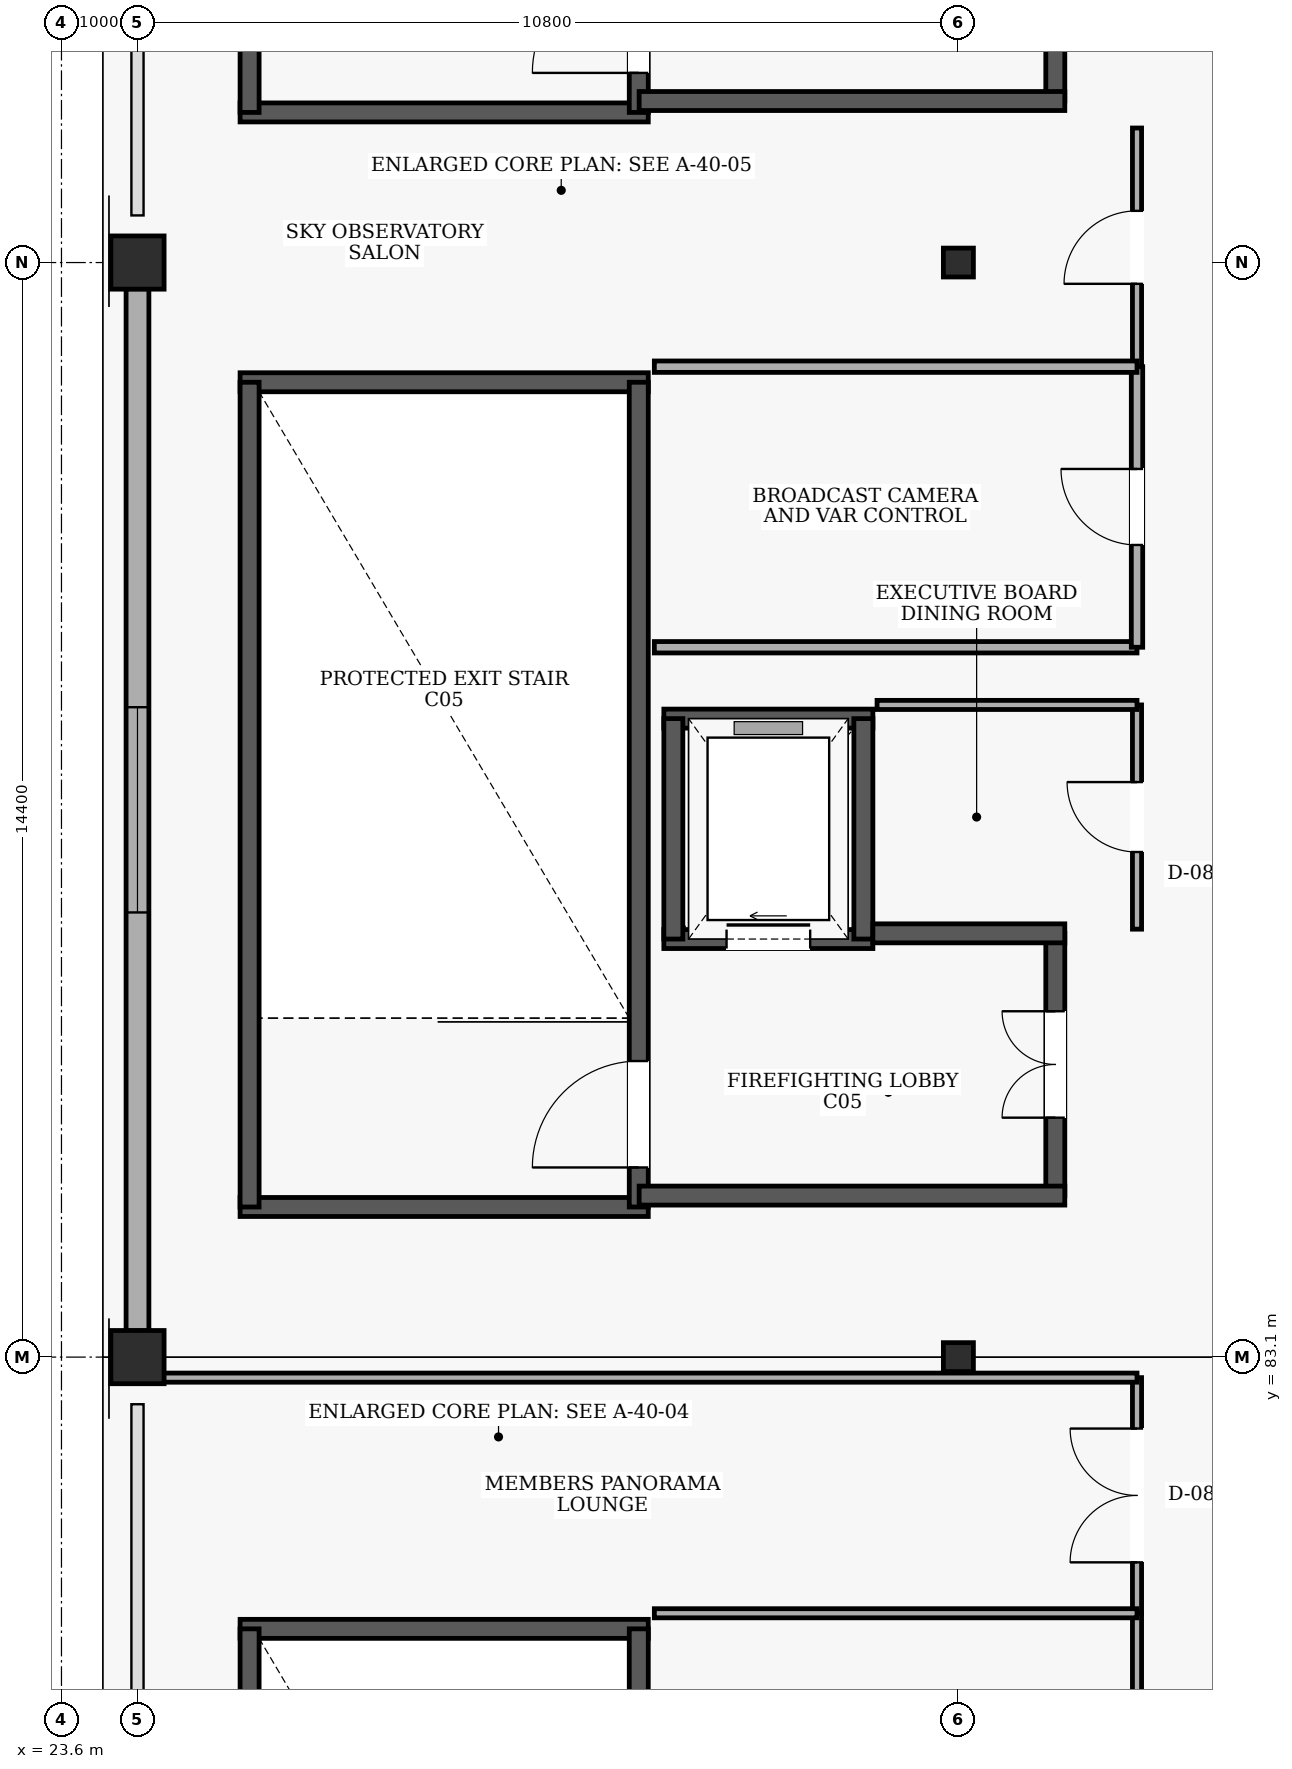
"""IFC4 building model, lengths in metres.
Left out: names, types, materials, properties, quantities, classifications, styles, units other than length and angle.
Written with IfcOpenShell. Run it as: python <this file> out.ifc"""

import sys

from ifc_helpers import new_model, si_unit, direction, frame, frame_2d, origin, origin_2d, place, context, subcontext, project, spatial, rectangle, i_section, extrude, element, fill, save


model = new_model("IFC4")
c1 = context("Model", 3, precision=1e-05, world=origin(), true_north=direction((0.0, 1.0)))
c2 = subcontext(c1, "Body", "Model", "MODEL_VIEW")
j1 = project(units=[si_unit("LENGTHUNIT", "METRE"), si_unit("PLANEANGLEUNIT", "RADIAN")], contexts=[c1])
p1 = place(None, origin())
s1 = spatial("IfcSite", under=j1, at=p1, CompositionType="ELEMENT")
p2 = place(p1, origin())
s2 = spatial("IfcBuilding", under=s1, at=p2, CompositionType="ELEMENT")
p3 = place(p2, frame((0.0, 0.0, 29.4)))
s3 = spatial("IfcBuildingStorey", under=s2, at=p3, CompositionType="ELEMENT", Elevation=29.4)
for number, where, z_axis, x_axis in (
    (1, (24.6, 83.1, 0.0), (0.0, 0.0, 1.0), (1.0, 0.0, 0.0)),
    (2, (24.6, 97.5, 0.0), (0.0, 0.0, 1.0), (1.0, 0.0, 0.0)),
):
    element("IfcColumn", number, at=place(p3, frame(where, z_axis=z_axis, x_axis=x_axis)), inside=s3, PredefinedType="COLUMN", context=c2, shape_type="SweptSolid", body=[
        extrude(rectangle(XDim=0.7, YDim=0.7, at=origin_2d()), origin(), (0.0, 0.0, 1.0), 4.8),
    ])
for number, where, z_axis, x_axis in (
    (3, (35.4, 83.1, 0.0), (0.0, 0.0, 1.0), (1.0, 0.0, 0.0)),
    (4, (35.4, 97.5, 0.0), (0.0, 0.0, 1.0), (1.0, 0.0, 0.0)),
):
    element("IfcColumn", number, at=place(p3, frame(where, z_axis=z_axis, x_axis=x_axis)), inside=s3, PredefinedType="COLUMN", context=c2, shape_type="SweptSolid", body=[
        extrude(i_section(OverallWidth=0.395, OverallDepth=0.38, WebThickness=0.019, FlangeThickness=0.03, at=origin_2d()), origin(), (0.0, 0.0, 1.0), 4.8),
    ])
p4 = place(p3, frame((24.6, 83.445, 0.0), z_axis=(0.0, 0.0, 1.0), x_axis=(0.0, 1.0, 0.0)))
e5 = element("IfcWall", 5, at=p4, inside=s3, PredefinedType="SOLIDWALL", context=c2, shape_type="SweptSolid", body=[
    extrude(rectangle(XDim=13.71, YDim=0.3, at=frame_2d((6.855, 0.0))), origin(), (0.0, 0.0, 1.0), 3.68),
])
p5 = place(p4, frame((5.505, 0.0, 0.9)))
e6 = element("IfcOpeningElement", 6, at=p5, cuts=e5, PredefinedType="OPENING", context=c2, shape_type="SweptSolid", body=[
    extrude(rectangle(XDim=2.7, YDim=1.8, at=frame_2d((1.35, 0.9))), frame((0.0, 0.16, 0.0), z_axis=(0.0, -1.0, 0.0), x_axis=(1.0, 0.0, 0.0)), (0.0, 0.0, 1.0), 0.32),
])
p6 = place(p3, frame((31.32, 79.525, 0.0), z_axis=(0.0, 0.0, 1.0), x_axis=(-1.0, 0.0, 0.0)))
e7 = element("IfcWall", 7, at=p6, inside=s3, PredefinedType="SHEAR", context=c2, shape_type="SweptSolid", body=[
    extrude(rectangle(XDim=5.37, YDim=0.25, at=frame_2d((2.685, 0.0))), origin(), (0.0, 0.0, 1.0), 4.5),
])
p7 = place(p3, frame((26.075, 68.675, 0.0), z_axis=(0.0, 0.0, 1.0), x_axis=(0.0, 1.0, 0.0)))
e8 = element("IfcWall", 8, at=p7, inside=s3, PredefinedType="SHEAR", context=c2, shape_type="SweptSolid", body=[
    extrude(rectangle(XDim=10.85, YDim=0.25, at=frame_2d((5.425, 0.0))), origin(), (0.0, 0.0, 1.0), 4.5),
])
p8 = place(p3, frame((31.195, 68.675, 0.0), z_axis=(0.0, 0.0, 1.0), x_axis=(0.0, 1.0, 0.0)))
e9 = element("IfcWall", 9, at=p8, inside=s3, PredefinedType="SHEAR", context=c2, shape_type="SweptSolid", body=[
    extrude(rectangle(XDim=10.85, YDim=0.25, at=frame_2d((5.425, 0.0))), origin(), (0.0, 0.0, 1.0), 4.5),
])
p9 = place(p8, frame((0.52, 0.0, 0.0)))
e10 = element("IfcOpeningElement", 10, at=p9, cuts=e9, PredefinedType="OPENING", context=c2, shape_type="SweptSolid", body=[
    extrude(rectangle(XDim=1.4, YDim=2.15, at=frame_2d((0.7, 1.075))), frame((0.0, 0.135, 0.0), z_axis=(0.0, -1.0, 0.0), x_axis=(1.0, 0.0, 0.0)), (0.0, 0.0, 1.0), 0.27),
])
for number, where, z_axis, x_axis in (
    (11, (25.95, 85.075, 0.0), (0.0, 0.0, 1.0), (1.0, 0.0, 0.0)),
    (12, (31.32, 95.925, 0.0), (0.0, 0.0, 1.0), (-1.0, 0.0, 0.0)),
):
    element("IfcWall", number, at=place(p3, frame(where, z_axis=z_axis, x_axis=x_axis)), inside=s3, PredefinedType="SHEAR", context=c2, shape_type="SweptSolid", body=[
        extrude(rectangle(XDim=5.37, YDim=0.25, at=frame_2d((2.685, 0.0))), origin(), (0.0, 0.0, 1.0), 4.5),
    ])
p10 = place(p3, frame((26.075, 85.075, 0.0), z_axis=(0.0, 0.0, 1.0), x_axis=(0.0, 1.0, 0.0)))
e13 = element("IfcWall", 13, at=p10, inside=s3, PredefinedType="SHEAR", context=c2, shape_type="SweptSolid", body=[
    extrude(rectangle(XDim=10.85, YDim=0.25, at=frame_2d((5.425, 0.0))), origin(), (0.0, 0.0, 1.0), 4.5),
])
p11 = place(p3, frame((31.195, 85.075, 0.0), z_axis=(0.0, 0.0, 1.0), x_axis=(0.0, 1.0, 0.0)))
e14 = element("IfcWall", 14, at=p11, inside=s3, PredefinedType="SHEAR", context=c2, shape_type="SweptSolid", body=[
    extrude(rectangle(XDim=10.85, YDim=0.25, at=frame_2d((5.425, 0.0))), origin(), (0.0, 0.0, 1.0), 4.5),
])
p12 = place(p11, frame((0.52, 0.0, 0.0)))
e15 = element("IfcOpeningElement", 15, at=p12, cuts=e14, PredefinedType="OPENING", context=c2, shape_type="SweptSolid", body=[
    extrude(rectangle(XDim=1.4, YDim=2.15, at=frame_2d((0.7, 1.075))), frame((0.0, 0.135, 0.0), z_axis=(0.0, -1.0, 0.0), x_axis=(1.0, 0.0, 0.0)), (0.0, 0.0, 1.0), 0.27),
])
p13 = place(p3, frame((25.95, 99.475, 0.0), z_axis=(0.0, 0.0, 1.0), x_axis=(1.0, 0.0, 0.0)))
e16 = element("IfcWall", 16, at=p13, inside=s3, PredefinedType="SHEAR", context=c2, shape_type="SweptSolid", body=[
    extrude(rectangle(XDim=5.37, YDim=0.25, at=frame_2d((2.685, 0.0))), origin(), (0.0, 0.0, 1.0), 4.5),
])
p14 = place(p3, frame((26.075, 99.475, 0.0), z_axis=(0.0, 0.0, 1.0), x_axis=(0.0, 1.0, 0.0)))
e17 = element("IfcWall", 17, at=p14, inside=s3, PredefinedType="SHEAR", context=c2, shape_type="SweptSolid", body=[
    extrude(rectangle(XDim=10.85, YDim=0.25, at=frame_2d((5.425, 0.0))), origin(), (0.0, 0.0, 1.0), 4.5),
])
p15 = place(p3, frame((31.195, 99.475, 0.0), z_axis=(0.0, 0.0, 1.0), x_axis=(0.0, 1.0, 0.0)))
e18 = element("IfcWall", 18, at=p15, inside=s3, PredefinedType="SHEAR", context=c2, shape_type="SweptSolid", body=[
    extrude(rectangle(XDim=10.85, YDim=0.25, at=frame_2d((5.425, 0.0))), origin(), (0.0, 0.0, 1.0), 4.5),
])
p16 = place(p15, frame((0.52, 0.0, 0.0)))
e19 = element("IfcOpeningElement", 19, at=p16, cuts=e18, PredefinedType="OPENING", context=c2, shape_type="SweptSolid", body=[
    extrude(rectangle(XDim=1.4, YDim=2.15, at=frame_2d((0.7, 1.075))), frame((0.0, 0.135, 0.0), z_axis=(0.0, -1.0, 0.0), x_axis=(1.0, 0.0, 0.0)), (0.0, 0.0, 1.0), 0.27),
])
p17 = place(p3, frame((31.525, 88.6, 0.0), z_axis=(0.0, 0.0, 1.0), x_axis=(1.0, 0.0, 0.0)))
e20 = element("IfcWall", 20, at=p17, inside=s3, PredefinedType="SHEAR", context=c2, shape_type="SweptSolid", body=[
    extrude(rectangle(XDim=2.75, YDim=0.25, at=frame_2d((1.375, 0.0))), origin(), (0.0, 0.0, 1.0), 4.5),
])
p18 = place(p17, frame((0.825, 0.0, 0.0)))
e21 = element("IfcOpeningElement", 21, at=p18, cuts=e20, PredefinedType="OPENING", context=c2, shape_type="SweptSolid", body=[
    extrude(rectangle(XDim=1.1, YDim=2.15, at=frame_2d((0.55, 1.075))), frame((0.0, 0.135, 0.0), z_axis=(0.0, -1.0, 0.0), x_axis=(1.0, 0.0, 0.0)), (0.0, 0.0, 1.0), 0.27),
])
p19 = place(p3, frame((34.275, 91.5, 0.0), z_axis=(0.0, 0.0, 1.0), x_axis=(-1.0, 0.0, 0.0)))
e22 = element("IfcWall", 22, at=p19, inside=s3, PredefinedType="SHEAR", context=c2, shape_type="SweptSolid", body=[
    extrude(rectangle(XDim=2.75, YDim=0.25, at=frame_2d((1.375, 0.0))), origin(), (0.0, 0.0, 1.0), 4.5),
])
for number, where, z_axis, x_axis in (
    (23, (31.65, 91.5, 0.0), (0.0, 0.0, 1.0), (0.0, -1.0, 0.0)),
    (24, (34.15, 88.6, 0.0), (0.0, 0.0, 1.0), (0.0, 1.0, 0.0)),
):
    element("IfcWall", number, at=place(p3, frame(where, z_axis=z_axis, x_axis=x_axis)), inside=s3, PredefinedType="SHEAR", context=c2, shape_type="SweptSolid", body=[
        extrude(rectangle(XDim=2.9, YDim=0.25, at=frame_2d((1.45, 0.0))), origin(), (0.0, 0.0, 1.0), 4.5),
    ])
p20 = place(p3, frame((36.675, 85.225, 0.0), z_axis=(0.0, 0.0, 1.0), x_axis=(0.0, 1.0, 0.0)))
e25 = element("IfcWall", 25, at=p20, inside=s3, PredefinedType="SHEAR", context=c2, shape_type="SweptSolid", body=[
    extrude(rectangle(XDim=3.45, YDim=0.25, at=frame_2d((1.725, 0.0))), origin(), (0.0, 0.0, 1.0), 4.5),
])
p21 = place(p20, frame((1.025, 0.0, 0.0)))
e26 = element("IfcOpeningElement", 26, at=p21, cuts=e25, PredefinedType="OPENING", context=c2, shape_type="SweptSolid", body=[
    extrude(rectangle(XDim=1.4, YDim=2.15, at=frame_2d((0.7, 1.075))), frame((0.0, 0.135, 0.0), z_axis=(0.0, -1.0, 0.0), x_axis=(1.0, 0.0, 0.0)), (0.0, 0.0, 1.0), 0.27),
])
p22 = place(p3, frame((34.275, 88.675, 0.0), z_axis=(0.0, 0.0, 1.0), x_axis=(1.0, 0.0, 0.0)))
e27 = element("IfcWall", 27, at=p22, inside=s3, PredefinedType="SHEAR", context=c2, shape_type="SweptSolid", body=[
    extrude(rectangle(XDim=2.525, YDim=0.25, at=frame_2d((1.263, 0.0))), origin(), (0.0, 0.0, 1.0), 4.5),
])
p23 = place(p3, frame((31.2, 85.225, 0.0), z_axis=(0.0, 0.0, 1.0), x_axis=(1.0, 0.0, 0.0)))
e28 = element("IfcWall", 28, at=p23, inside=s3, PredefinedType="SHEAR", context=c2, shape_type="SweptSolid", body=[
    extrude(rectangle(XDim=5.6, YDim=0.25, at=frame_2d((2.8, 0.0))), origin(), (0.0, 0.0, 1.0), 4.5),
])
p24 = place(p3, frame((36.675, 99.625, 0.0), z_axis=(0.0, 0.0, 1.0), x_axis=(0.0, 1.0, 0.0)))
e29 = element("IfcWall", 29, at=p24, inside=s3, PredefinedType="SHEAR", context=c2, shape_type="SweptSolid", body=[
    extrude(rectangle(XDim=3.45, YDim=0.25, at=frame_2d((1.725, 0.0))), origin(), (0.0, 0.0, 1.0), 4.5),
])
p25 = place(p24, frame((1.025, 0.0, 0.0)))
e30 = element("IfcOpeningElement", 30, at=p25, cuts=e29, PredefinedType="OPENING", context=c2, shape_type="SweptSolid", body=[
    extrude(rectangle(XDim=1.4, YDim=2.15, at=frame_2d((0.7, 1.075))), frame((0.0, 0.135, 0.0), z_axis=(0.0, -1.0, 0.0), x_axis=(1.0, 0.0, 0.0)), (0.0, 0.0, 1.0), 0.27),
])
p26 = place(p3, frame((31.2, 99.625, 0.0), z_axis=(0.0, 0.0, 1.0), x_axis=(1.0, 0.0, 0.0)))
e31 = element("IfcWall", 31, at=p26, inside=s3, PredefinedType="SHEAR", context=c2, shape_type="SweptSolid", body=[
    extrude(rectangle(XDim=5.6, YDim=0.25, at=frame_2d((2.8, 0.0))), origin(), (0.0, 0.0, 1.0), 4.5),
])
p27 = place(p3, frame((37.75, 79.73, 0.0), z_axis=(0.0, 0.0, 1.0), x_axis=(0.0, 1.0, 0.0)))
e32 = element("IfcWall", 32, at=p27, inside=s3, PredefinedType="PARTITIONING", context=c2, shape_type="SweptSolid", body=[
    extrude(rectangle(XDim=3.1, YDim=0.12, at=frame_2d((1.55, 0.0))), origin(), (0.0, 0.0, 1.0), 4.5),
])
p28 = place(p27, frame((0.67, 0.0, 0.0)))
e33 = element("IfcOpeningElement", 33, at=p28, cuts=e32, PredefinedType="OPENING", context=c2, shape_type="SweptSolid", body=[
    extrude(rectangle(XDim=1.76, YDim=2.25, at=frame_2d((0.88, 1.125))), frame((0.0, 0.07, 0.0), z_axis=(0.0, -1.0, 0.0), x_axis=(1.0, 0.0, 0.0)), (0.0, 0.0, 1.0), 0.14),
])
p29 = place(p3, frame((37.75, 82.83, 0.0), z_axis=(0.0, 0.0, 1.0), x_axis=(-1.0, 0.0, 0.0)))
e34 = element("IfcWall", 34, at=p29, inside=s3, PredefinedType="PARTITIONING", context=c2, shape_type="SweptSolid", body=[
    extrude(rectangle(XDim=13.265, YDim=0.12, at=frame_2d((6.632, 0.0))), origin(), (0.0, 0.0, 1.0), 3.78),
])
p30 = place(p3, frame((37.75, 75.28, 0.0), z_axis=(0.0, 0.0, 1.0), x_axis=(0.0, 1.0, 0.0)))
e35 = element("IfcWall", 35, at=p30, inside=s3, PredefinedType="PARTITIONING", context=c2, shape_type="SweptSolid", body=[
    extrude(rectangle(XDim=4.45, YDim=0.12, at=frame_2d((2.225, 0.0))), origin(), (0.0, 0.0, 1.0), 4.5),
])
p31 = place(p30, frame((1.295, 0.0, 0.0)))
e36 = element("IfcOpeningElement", 36, at=p31, cuts=e35, PredefinedType="OPENING", context=c2, shape_type="SweptSolid", body=[
    extrude(rectangle(XDim=1.86, YDim=2.3, at=frame_2d((0.93, 1.15))), frame((0.0, 0.07, 0.0), z_axis=(0.0, -1.0, 0.0), x_axis=(1.0, 0.0, 0.0)), (0.0, 0.0, 1.0), 0.14),
])
p32 = place(p3, frame((37.75, 79.73, 0.0), z_axis=(0.0, 0.0, 1.0), x_axis=(-1.0, 0.0, 0.0)))
e37 = element("IfcWall", 37, at=p32, inside=s3, PredefinedType="PARTITIONING", context=c2, shape_type="SweptSolid", body=[
    extrude(rectangle(XDim=6.35, YDim=0.12, at=frame_2d((3.175, 0.0))), origin(), (0.0, 0.0, 1.0), 4.5),
])
p33 = place(p3, frame((37.75, 88.73, 0.0), z_axis=(0.0, 0.0, 1.0), x_axis=(0.0, 1.0, 0.0)))
e38 = element("IfcWall", 38, at=p33, inside=s3, PredefinedType="PARTITIONING", context=c2, shape_type="SweptSolid", body=[
    extrude(rectangle(XDim=2.95, YDim=0.12, at=frame_2d((1.475, 0.0))), origin(), (0.0, 0.0, 1.0), 4.5),
])
p34 = place(p33, frame((1.015, 0.0, 0.0)))
e39 = element("IfcOpeningElement", 39, at=p34, cuts=e38, PredefinedType="OPENING", context=c2, shape_type="SweptSolid", body=[
    extrude(rectangle(XDim=0.92, YDim=2.1, at=frame_2d((0.46, 1.05))), frame((0.0, 0.07, 0.0), z_axis=(0.0, -1.0, 0.0), x_axis=(1.0, 0.0, 0.0)), (0.0, 0.0, 1.0), 0.14),
])
p35 = place(p3, frame((37.75, 91.68, 0.0), z_axis=(0.0, 0.0, 1.0), x_axis=(-1.0, 0.0, 0.0)))
e40 = element("IfcWall", 40, at=p35, inside=s3, PredefinedType="PARTITIONING", context=c2, shape_type="SweptSolid", body=[
    extrude(rectangle(XDim=3.42, YDim=0.12, at=frame_2d((1.71, 0.0))), origin(), (0.0, 0.0, 1.0), 4.5),
])
p36 = place(p3, frame((37.75, 96.13, 0.0), z_axis=(0.0, 0.0, 1.0), x_axis=(0.0, 1.0, 0.0)))
e41 = element("IfcWall", 41, at=p36, inside=s3, PredefinedType="PARTITIONING", context=c2, shape_type="SweptSolid", body=[
    extrude(rectangle(XDim=3.14, YDim=0.12, at=frame_2d((1.57, 0.0))), origin(), (0.0, 0.0, 1.0), 4.5),
])
p37 = place(p36, frame((1.09, 0.0, 0.0)))
e42 = element("IfcOpeningElement", 42, at=p37, cuts=e41, PredefinedType="OPENING", context=c2, shape_type="SweptSolid", body=[
    extrude(rectangle(XDim=0.96, YDim=2.1, at=frame_2d((0.48, 1.05))), frame((0.0, 0.07, 0.0), z_axis=(0.0, -1.0, 0.0), x_axis=(1.0, 0.0, 0.0)), (0.0, 0.0, 1.0), 0.14),
])
p38 = place(p3, frame((31.4, 92.439, 0.0), z_axis=(0.0, 0.0, 1.0), x_axis=(1.0, 0.0, 0.0)))
e43 = element("IfcWall", 43, at=p38, inside=s3, PredefinedType="PARTITIONING", context=c2, shape_type="SweptSolid", body=[
    extrude(rectangle(XDim=6.35, YDim=0.15, at=frame_2d((3.175, 0.0))), origin(), (0.0, 0.0, 1.0), 4.5),
])
p39 = place(p3, frame((37.75, 92.439, 0.0), z_axis=(0.0, 0.0, 1.0), x_axis=(0.0, 1.0, 0.0)))
e44 = element("IfcWall", 44, at=p39, inside=s3, PredefinedType="PARTITIONING", context=c2, shape_type="SweptSolid", body=[
    extrude(rectangle(XDim=3.691, YDim=0.15, at=frame_2d((1.846, 0.0))), origin(), (0.0, 0.0, 1.0), 4.5),
])
p40 = place(p39, frame((1.346, 0.0, 0.0)))
e45 = element("IfcOpeningElement", 45, at=p40, cuts=e44, PredefinedType="OPENING", context=c2, shape_type="SweptSolid", body=[
    extrude(rectangle(XDim=1.0, YDim=2.1, at=frame_2d((0.5, 1.05))), frame((0.0, 0.085, 0.0), z_axis=(0.0, -1.0, 0.0), x_axis=(1.0, 0.0, 0.0)), (0.0, 0.0, 1.0), 0.17),
])
p41 = place(p3, frame((37.75, 96.13, 0.0), z_axis=(0.0, 0.0, 1.0), x_axis=(-1.0, 0.0, 0.0)))
e46 = element("IfcWall", 46, at=p41, inside=s3, PredefinedType="PARTITIONING", context=c2, shape_type="SweptSolid", body=[
    extrude(rectangle(XDim=6.35, YDim=0.15, at=frame_2d((3.175, 0.0))), origin(), (0.0, 0.0, 1.0), 4.5),
])
p42 = place(p5, origin())
e47 = element("IfcWindow", 47, at=p42, inside=s3, PartitioningType="SINGLE_PANEL", PredefinedType="WINDOW", context=c2, shape_type="SweptSolid", body=[
    extrude(rectangle(XDim=2.7, YDim=1.8, at=frame_2d((1.35, 0.9))), frame((0.0, 0.03, 0.0), z_axis=(0.0, -1.0, 0.0), x_axis=(1.0, 0.0, 0.0)), (0.0, 0.0, 1.0), 0.06),
])
fill(e6, e47)
p43 = place(p12, origin())
e48 = element("IfcDoor", 48, at=p43, inside=s3, OperationType="SINGLE_SWING_LEFT", PredefinedType="DOOR", context=c2, shape_type="SweptSolid", body=[
    extrude(rectangle(XDim=1.4, YDim=2.15, at=frame_2d((0.7, 1.075))), frame((0.0, 0.025, 0.0), z_axis=(0.0, -1.0, 0.0), x_axis=(1.0, 0.0, 0.0)), (0.0, 0.0, 1.0), 0.05),
])
fill(e15, e48)
p44 = place(p16, origin())
e49 = element("IfcDoor", 49, at=p44, inside=s3, OperationType="SINGLE_SWING_LEFT", PredefinedType="DOOR", context=c2, shape_type="SweptSolid", body=[
    extrude(rectangle(XDim=1.4, YDim=2.15, at=frame_2d((0.7, 1.075))), frame((0.0, 0.025, 0.0), z_axis=(0.0, -1.0, 0.0), x_axis=(1.0, 0.0, 0.0)), (0.0, 0.0, 1.0), 0.05),
])
fill(e19, e49)
p45 = place(p18, origin())
e50 = element("IfcDoor", 50, at=p45, inside=s3, OperationType="SLIDING_TO_RIGHT", PredefinedType="DOOR", context=c2, shape_type="SweptSolid", body=[
    extrude(rectangle(XDim=1.1, YDim=2.15, at=frame_2d((0.55, 1.075))), frame((0.0, 0.025, 0.0), z_axis=(0.0, -1.0, 0.0), x_axis=(1.0, 0.0, 0.0)), (0.0, 0.0, 1.0), 0.05),
])
fill(e21, e50)
p46 = place(p21, origin())
e51 = element("IfcDoor", 51, at=p46, inside=s3, OperationType="DOUBLE_DOOR_SINGLE_SWING", PredefinedType="DOOR", context=c2, shape_type="SweptSolid", body=[
    extrude(rectangle(XDim=1.4, YDim=2.15, at=frame_2d((0.7, 1.075))), frame((0.0, 0.025, 0.0), z_axis=(0.0, -1.0, 0.0), x_axis=(1.0, 0.0, 0.0)), (0.0, 0.0, 1.0), 0.05),
])
fill(e26, e51)
p47 = place(p28, origin())
e52 = element("IfcDoor", 52, at=p47, inside=s3, OperationType="DOUBLE_DOOR_SINGLE_SWING", PredefinedType="DOOR", context=c2, shape_type="SweptSolid", body=[
    extrude(rectangle(XDim=1.76, YDim=2.25, at=frame_2d((0.88, 1.125))), frame((0.0, 0.025, 0.0), z_axis=(0.0, -1.0, 0.0), x_axis=(1.0, 0.0, 0.0)), (0.0, 0.0, 1.0), 0.05),
])
fill(e33, e52)
p48 = place(p34, origin())
e53 = element("IfcDoor", 53, at=p48, inside=s3, OperationType="SINGLE_SWING_RIGHT", PredefinedType="DOOR", context=c2, shape_type="SweptSolid", body=[
    extrude(rectangle(XDim=0.92, YDim=2.1, at=frame_2d((0.46, 1.05))), frame((0.0, 0.025, 0.0), z_axis=(0.0, -1.0, 0.0), x_axis=(1.0, 0.0, 0.0)), (0.0, 0.0, 1.0), 0.05),
])
fill(e39, e53)
p49 = place(p37, origin())
e54 = element("IfcDoor", 54, at=p49, inside=s3, OperationType="SINGLE_SWING_LEFT", PredefinedType="DOOR", context=c2, shape_type="SweptSolid", body=[
    extrude(rectangle(XDim=0.96, YDim=2.1, at=frame_2d((0.48, 1.05))), frame((0.0, 0.025, 0.0), z_axis=(0.0, -1.0, 0.0), x_axis=(1.0, 0.0, 0.0)), (0.0, 0.0, 1.0), 0.05),
])
fill(e42, e54)
p50 = place(p40, origin())
e55 = element("IfcDoor", 55, at=p50, inside=s3, OperationType="SINGLE_SWING_RIGHT", PredefinedType="DOOR", context=c2, shape_type="SweptSolid", body=[
    extrude(rectangle(XDim=1.0, YDim=2.1, at=frame_2d((0.5, 1.05))), frame((0.0, 0.025, 0.0), z_axis=(0.0, -1.0, 0.0), x_axis=(1.0, 0.0, 0.0)), (0.0, 0.0, 1.0), 0.05),
])
fill(e45, e55)
save(model, sys.argv[1])
